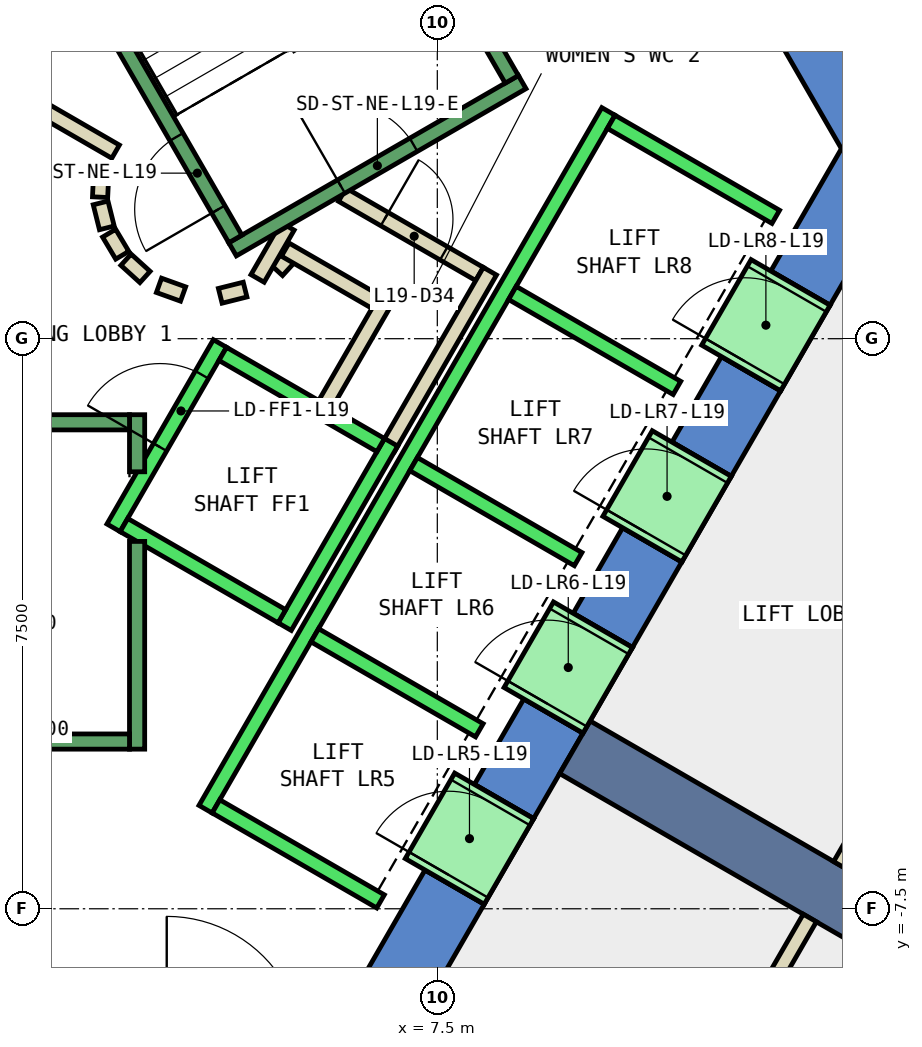
"""IFC4 building model, lengths in metres.
Left out: names, types, materials, properties, quantities, classifications, styles, units other than length and angle.
Written with IfcOpenShell. Run it as: python <this file> out.ifc"""

import sys

from ifc_helpers import new_model, si_unit, direction, frame, frame_2d, origin, place, context, subcontext, project, spatial, polyline, rectangle, outline, extrude, element, fill, save


model = new_model("IFC4")
c1 = context("Model", 3, precision=1e-05, world=origin(), true_north=direction((0.0, 1.0)))
c2 = subcontext(c1, "Body", "Model", "MODEL_VIEW")
j1 = project(units=[si_unit("LENGTHUNIT", "METRE"), si_unit("PLANEANGLEUNIT", "RADIAN")], contexts=[c1])
p1 = place(None, origin())
s1 = spatial("IfcSite", under=j1, at=p1, CompositionType="ELEMENT")
p2 = place(p1, origin())
s2 = spatial("IfcBuilding", under=s1, at=p2, CompositionType="ELEMENT")
p3 = place(p2, frame((0.0, 0.0, 90.8)))
s3 = spatial("IfcBuildingStorey", under=s2, at=p3, CompositionType="ELEMENT", Elevation=90.8)
p4 = place(p3, frame((0.0, 0.0, -0.4)))
e1 = element("IfcWall", 1, at=p4, inside=s3, PredefinedType="SHEAR", context=c2, shape_type="SweptSolid", body=[
    extrude(outline(polyline([(8.517, 11.748), (7.738, 11.298), (12.817, 2.5), (13.856, 2.5), (8.517, 11.748)])), origin(), (0.0, 0.0, 1.0), 4.2),
])
p5 = place(p3, frame((0.0, 0.0, -0.4)))
e2 = element("IfcWall", 2, at=p5, inside=s3, PredefinedType="SHEAR", context=c2, shape_type="SweptSolid", body=[
    extrude(outline(polyline([(8.117, -7.44), (7.338, -6.99), (6.409, -8.6), (6.928, -9.5), (8.117, -7.44)])), origin(), (0.0, 0.0, 1.0), 4.2),
])
p6 = place(p3, frame((0.0, 0.0, -0.4)))
e3 = element("IfcWall", 3, at=p6, inside=s3, PredefinedType="SHEAR", context=c2, shape_type="SweptSolid", body=[
    extrude(outline(polyline([(9.417, -5.189), (8.638, -4.739), (7.988, -5.864), (8.767, -6.314), (9.417, -5.189)])), origin(), (0.0, 0.0, 1.0), 4.2),
])
p7 = place(p3, frame((0.0, 0.0, -0.4)))
e4 = element("IfcWall", 4, at=p7, inside=s3, PredefinedType="SHEAR", context=c2, shape_type="SweptSolid", body=[
    extrude(outline(polyline([(10.717, -2.937), (9.938, -2.487), (9.288, -3.613), (10.067, -4.063), (10.717, -2.937)])), origin(), (0.0, 0.0, 1.0), 4.2),
])
p8 = place(p3, frame((0.0, 0.0, -0.4)))
e5 = element("IfcWall", 5, at=p8, inside=s3, PredefinedType="SHEAR", context=c2, shape_type="SweptSolid", body=[
    extrude(outline(polyline([(12.017, -0.686), (11.238, -0.236), (10.588, -1.361), (11.367, -1.811), (12.017, -0.686)])), origin(), (0.0, 0.0, 1.0), 4.2),
])
p9 = place(p3, frame((0.0, 0.0, -0.4)))
e6 = element("IfcWall", 6, at=p9, inside=s3, PredefinedType="SHEAR", context=c2, shape_type="SweptSolid", body=[
    extrude(outline(polyline([(11.888, 0.89), (12.667, 0.44), (13.856, 2.5), (12.817, 2.5), (11.888, 0.89)])), origin(), (0.0, 0.0, 1.0), 4.2),
])
p10 = place(p3, frame((0.0, 0.0, 3.6)))
e7 = element("IfcWall", 7, at=p10, inside=s3, PredefinedType="SHEAR", context=c2, shape_type="SweptSolid", body=[
    extrude(outline(polyline([(8.767, -6.314), (7.988, -5.864), (7.338, -6.99), (8.117, -7.44), (8.767, -6.314)])), origin(), (0.0, 0.0, 1.0), 0.2),
])
p11 = place(p3, frame((0.0, 0.0, 3.6)))
e8 = element("IfcWall", 8, at=p11, inside=s3, PredefinedType="SHEAR", context=c2, shape_type="SweptSolid", body=[
    extrude(outline(polyline([(10.067, -4.063), (9.288, -3.613), (8.638, -4.739), (9.417, -5.189), (10.067, -4.063)])), origin(), (0.0, 0.0, 1.0), 0.2),
])
p12 = place(p3, frame((0.0, 0.0, 3.6)))
e9 = element("IfcWall", 9, at=p12, inside=s3, PredefinedType="SHEAR", context=c2, shape_type="SweptSolid", body=[
    extrude(outline(polyline([(11.367, -1.811), (10.588, -1.361), (9.938, -2.487), (10.717, -2.937), (11.367, -1.811)])), origin(), (0.0, 0.0, 1.0), 0.2),
])
p13 = place(p3, frame((0.0, 0.0, 3.6)))
e10 = element("IfcWall", 10, at=p13, inside=s3, PredefinedType="SHEAR", context=c2, shape_type="SweptSolid", body=[
    extrude(outline(polyline([(12.667, 0.44), (11.888, 0.89), (11.238, -0.236), (12.017, -0.686), (12.667, 0.44)])), origin(), (0.0, 0.0, 1.0), 0.2),
])
p14 = place(p3, frame((9.31, -5.375, -0.4), z_axis=(0.0, 0.0, 1.0), x_axis=(0.866017533419, -0.500013631625, 0.0)))
e11 = element("IfcWall", 11, at=p14, inside=s3, PredefinedType="SHEAR", context=c2, shape_type="SweptSolid", body=[
    extrude(rectangle(XDim=9.0, YDim=0.8, at=frame_2d((4.5, 0.0))), origin(), (0.0, 0.0, 1.0), 4.2),
])
p15 = place(p3, frame((5.39, 0.898, 0.0), z_axis=(0.0, 0.0, 1.0), x_axis=(0.673828488714, 0.738887791073, 0.0)))
e12 = element("IfcWall", 12, at=p15, inside=s3, PredefinedType="PARTITIONING", context=c2, shape_type="SweptSolid", body=[
    extrude(rectangle(XDim=0.263, YDim=0.2, at=frame_2d((0.131, 0.0))), origin(), (0.0, 0.0, 1.0), 3.8),
])
p16 = place(p3, frame((5.499, 1.172, 0.0), z_axis=(0.0, 0.0, 1.0), x_axis=(0.866333505267, -0.499465972466, 0.0)))
e13 = element("IfcWall", 13, at=p16, inside=s3, PredefinedType="PARTITIONING", context=c2, shape_type="SweptSolid", body=[
    extrude(rectangle(XDim=1.374, YDim=0.2, at=frame_2d((0.687, 0.0))), origin(), (0.0, 0.0, 1.0), 3.8),
])
p17 = place(p3, frame((6.826, 0.522, 0.0), z_axis=(0.0, 0.0, 1.0), x_axis=(-0.500016722714, -0.866015748706, 0.0)))
e14 = element("IfcWall", 14, at=p17, inside=s3, PredefinedType="PARTITIONING", context=c2, shape_type="SweptSolid", body=[
    extrude(rectangle(XDim=1.7, YDim=0.2, at=frame_2d((0.85, 0.0))), origin(), (0.0, 0.0, 1.0), 3.8),
])
p18 = place(p3, frame((6.25, 1.894, 0.0), z_axis=(0.0, 0.0, 1.0), x_axis=(0.866043184279, -0.499969202016, 0.0)))
e15 = element("IfcWall", 15, at=p18, inside=s3, PredefinedType="PARTITIONING", context=c2, shape_type="SweptSolid", body=[
    extrude(rectangle(XDim=2.084, YDim=0.2, at=frame_2d((1.042, 0.0))), origin(), (0.0, 0.0, 1.0), 3.8),
])
p19 = place(p18, frame((0.642, 0.0, 0.0)))
e16 = element("IfcOpeningElement", 16, at=p19, cuts=e15, PredefinedType="OPENING", context=c2, shape_type="SweptSolid", body=[
    extrude(rectangle(XDim=0.9, YDim=2.1, at=frame_2d((0.45, 1.05))), frame((0.0, 0.11, 0.0), z_axis=(0.0, -1.0, 0.0), x_axis=(1.0, 0.0, 0.0)), (0.0, 0.0, 1.0), 0.22),
])
p20 = place(p3, frame((8.192, 0.888, 0.0), z_axis=(0.0, 0.0, 1.0), x_axis=(-0.499940625693, -0.866059680843, 0.0)))
e17 = element("IfcWall", 17, at=p20, inside=s3, PredefinedType="PARTITIONING", context=c2, shape_type="SweptSolid", body=[
    extrude(rectangle(XDim=2.68, YDim=0.2, at=frame_2d((1.34, 0.0))), origin(), (0.0, 0.0, 1.0), 3.8),
])
p21 = place(p3, frame((5.135, 0.793, 0.0), z_axis=(0.0, 0.0, 1.0), x_axis=(0.499526442893, 0.866298639529, 0.0)))
e18 = element("IfcWall", 18, at=p21, inside=s3, PredefinedType="PARTITIONING", context=c2, shape_type="SweptSolid", body=[
    extrude(rectangle(XDim=0.791, YDim=0.2, at=frame_2d((0.396, 0.0))), origin(), (0.0, 0.0, 1.0), 3.8),
])
p22 = place(p3, frame((2.012, 3.186, 0.0), z_axis=(0.0, 0.0, 1.0), x_axis=(0.865891012941, -0.500232699559, 0.0)))
e19 = element("IfcWall", 19, at=p22, inside=s3, PredefinedType="PARTITIONING", context=c2, shape_type="SweptSolid", body=[
    extrude(rectangle(XDim=1.449, YDim=0.2, at=frame_2d((0.725, 0.0))), origin(), (0.0, 0.0, 1.0), 3.8),
])
p23 = place(p3, frame((3.079, 2.199, 0.0), z_axis=(0.0, 0.0, 1.0), x_axis=(-0.047771483479, -0.998858290933, 0.0)))
e20 = element("IfcWall", 20, at=p23, inside=s3, PredefinedType="PARTITIONING", context=c2, shape_type="SweptSolid", body=[
    extrude(rectangle(XDim=0.337, YDim=0.2, at=frame_2d((0.169, 0.0))), origin(), (0.0, 0.0, 1.0), 3.8),
])
p24 = place(p3, frame((3.07, 1.786, 0.0), z_axis=(0.0, 0.0, 1.0), x_axis=(0.242705583207, -0.970099994784, 0.0)))
e21 = element("IfcWall", 21, at=p24, inside=s3, PredefinedType="PARTITIONING", context=c2, shape_type="SweptSolid", body=[
    extrude(rectangle(XDim=0.338, YDim=0.2, at=frame_2d((0.169, 0.0))), origin(), (0.0, 0.0, 1.0), 3.8),
])
for number, where, z_axis, x_axis in (
    (22, (3.182, 1.388, 0.0), (0.0, 0.0, 1.0), (0.512, -0.859, 0.0)),
    (23, (3.404, 1.039, 0.0), (0.0, 0.0, 1.0), (0.74, -0.672, 0.0)),
):
    element("IfcWall", number, at=place(p3, frame(where, z_axis=z_axis, x_axis=x_axis)), inside=s3, PredefinedType="PARTITIONING", context=c2, shape_type="SweptSolid", body=[
        extrude(rectangle(XDim=0.338, YDim=0.2, at=frame_2d((0.169, 0.0))), origin(), (0.0, 0.0, 1.0), 3.8),
    ])
p25 = place(p3, frame((3.838, 0.702, 0.0), z_axis=(0.0, 0.0, 1.0), x_axis=(0.941035081519, -0.338308993895, 0.0)))
e24 = element("IfcWall", 24, at=p25, inside=s3, PredefinedType="PARTITIONING", context=c2, shape_type="SweptSolid", body=[
    extrude(rectangle(XDim=0.337, YDim=0.2, at=frame_2d((0.168, 0.0))), origin(), (0.0, 0.0, 1.0), 3.8),
])
p26 = place(p3, frame((4.644, 0.564, 0.0), z_axis=(0.0, 0.0, 1.0), x_axis=(0.969929076366, 0.243387729394, 0.0)))
e25 = element("IfcWall", 25, at=p26, inside=s3, PredefinedType="PARTITIONING", context=c2, shape_type="SweptSolid", body=[
    extrude(rectangle(XDim=0.337, YDim=0.2, at=frame_2d((0.168, 0.0))), origin(), (0.0, 0.0, 1.0), 3.8),
])
p27 = place(p3, frame((18.009, 2.092, 0.0), z_axis=(0.0, 0.0, 1.0), x_axis=(-0.499980796252, -0.866036490789, 0.0)))
e26 = element("IfcWall", 26, at=p27, inside=s3, PredefinedType="PARTITIONING", context=c2, shape_type="SweptSolid", body=[
    extrude(rectangle(XDim=10.417, YDim=0.2, at=frame_2d((5.208, 0.0))), origin(), (0.0, 0.0, 1.0), 3.8),
])
p28 = place(p3, frame((12.401, -7.621, 0.0), z_axis=(0.0, 0.0, 1.0), x_axis=(-0.499983724212, -0.866034800411, 0.0)))
e27 = element("IfcWall", 27, at=p28, inside=s3, PredefinedType="PARTITIONING", context=c2, shape_type="SweptSolid", body=[
    extrude(rectangle(XDim=9.302, YDim=0.2, at=frame_2d((4.651, 0.0))), origin(), (0.0, 0.0, 1.0), 3.8),
])
p29 = place(p3, frame((3.24, -2.488, 0.0), z_axis=(0.0, 0.0, 1.0), x_axis=(0.49994636267, 0.866056369097, 0.0)))
e28 = element("IfcWall", 28, at=p29, inside=s3, PredefinedType="STANDARD", context=c2, shape_type="SweptSolid", body=[
    extrude(rectangle(XDim=2.8, YDim=0.2, at=frame_2d((1.4, 0.0))), origin(), (0.0, 0.0, 1.0), 3.8),
])
p30 = place(p29, frame((1.225, 0.0, 0.0)))
e29 = element("IfcOpeningElement", 29, at=p30, cuts=e28, PredefinedType="OPENING", context=c2, shape_type="SweptSolid", body=[
    extrude(rectangle(XDim=1.1, YDim=2.1, at=frame_2d((0.55, 1.05))), frame((0.0, 0.11, 0.0), z_axis=(0.0, -1.0, 0.0), x_axis=(1.0, 0.0, 0.0)), (0.0, 0.0, 1.0), 0.22),
])
p31 = place(p3, frame((5.492, -3.788, 0.0), z_axis=(0.0, 0.0, 1.0), x_axis=(0.500011755427, 0.866018616679, 0.0)))
e30 = element("IfcWall", 30, at=p31, inside=s3, PredefinedType="STANDARD", context=c2, shape_type="SweptSolid", body=[
    extrude(rectangle(XDim=2.8, YDim=0.2, at=frame_2d((1.4, 0.0))), origin(), (0.0, 0.0, 1.0), 3.8),
])
p32 = place(p3, frame((3.377, -2.452, 0.0), z_axis=(0.0, 0.0, 1.0), x_axis=(0.865955154139, -0.50012165622, 0.0)))
e31 = element("IfcWall", 31, at=p32, inside=s3, PredefinedType="STANDARD", context=c2, shape_type="SweptSolid", body=[
    extrude(rectangle(XDim=2.4, YDim=0.2, at=frame_2d((1.2, 0.0))), origin(), (0.0, 0.0, 1.0), 3.8),
])
p33 = place(p3, frame((4.677, -0.2, 0.0), z_axis=(0.0, 0.0, 1.0), x_axis=(0.865973769406, -0.500089422704, 0.0)))
e32 = element("IfcWall", 32, at=p33, inside=s3, PredefinedType="STANDARD", context=c2, shape_type="SweptSolid", body=[
    extrude(rectangle(XDim=2.399, YDim=0.2, at=frame_2d((1.2, 0.0))), origin(), (0.0, 0.0, 1.0), 3.8),
])
p34 = place(p3, frame((4.451, -6.19, 0.0), z_axis=(0.0, 0.0, 1.0), x_axis=(0.50000090737, 0.866024879913, 0.0)))
e33 = element("IfcWall", 33, at=p34, inside=s3, PredefinedType="STANDARD", context=c2, shape_type="SweptSolid", body=[
    extrude(rectangle(XDim=10.6, YDim=0.2, at=frame_2d((5.3, 0.0))), origin(), (0.0, 0.0, 1.0), 3.8),
])
for number, where, z_axis, x_axis in (
    (34, (4.588, -6.153, 0.0), (0.0, 0.0, 1.0), (0.866, -0.5, 0.0)),
    (35, (5.888, -3.902, 0.0), (0.0, 0.0, 1.0), (0.866, -0.5, 0.0)),
    (36, (7.188, -1.65, 0.0), (0.0, 0.0, 1.0), (0.866, -0.5, 0.0)),
    (37, (8.488, 0.602, 0.0), (0.0, 0.0, 1.0), (0.866, -0.5, 0.0)),
):
    element("IfcWall", number, at=place(p3, frame(where, z_axis=z_axis, x_axis=x_axis)), inside=s3, PredefinedType="STANDARD", context=c2, shape_type="SweptSolid", body=[
        extrude(rectangle(XDim=2.5, YDim=0.2, at=frame_2d((1.25, 0.0))), origin(), (0.0, 0.0, 1.0), 3.8),
    ])
p35 = place(p3, frame((9.788, 2.853, 0.0), z_axis=(0.0, 0.0, 1.0), x_axis=(0.865998541277, -0.500046524342, 0.0)))
e38 = element("IfcWall", 38, at=p35, inside=s3, PredefinedType="STANDARD", context=c2, shape_type="SweptSolid", body=[
    extrude(rectangle(XDim=2.5, YDim=0.2, at=frame_2d((1.25, 0.0))), origin(), (0.0, 0.0, 1.0), 3.8),
])
p36 = place(p3, frame((7.598, -7.14, 0.0), z_axis=(0.0, 0.0, 1.0), x_axis=(0.500362116554, 0.865816234728, 0.0)))
e39 = element("IfcWall", 39, at=p36, inside=s3, PredefinedType="STANDARD", context=c2, shape_type="SweptSolid", body=[
    extrude(rectangle(XDim=1.299, YDim=1.2, at=frame_2d((0.65, 0.0))), origin(), (0.0, 0.0, 1.0), 2.4),
])
p37 = place(p36, frame((0.1, 0.0, 0.0)))
e40 = element("IfcOpeningElement", 40, at=p37, cuts=e39, PredefinedType="OPENING", context=c2, shape_type="SweptSolid", body=[
    extrude(rectangle(XDim=1.1, YDim=2.3, at=frame_2d((0.55, 1.15))), frame((0.0, 0.61, 0.0), z_axis=(0.0, -1.0, 0.0), x_axis=(1.0, 0.0, 0.0)), (0.0, 0.0, 1.0), 1.22),
])
p38 = place(p3, frame((8.898, -4.889, 0.0), z_axis=(0.0, 0.0, 1.0), x_axis=(0.500036693733, 0.866004217611, 0.0)))
e41 = element("IfcWall", 41, at=p38, inside=s3, PredefinedType="STANDARD", context=c2, shape_type="SweptSolid", body=[
    extrude(rectangle(XDim=1.3, YDim=1.2, at=frame_2d((0.65, 0.0))), origin(), (0.0, 0.0, 1.0), 2.4),
])
p39 = place(p38, frame((0.1, 0.0, 0.0)))
e42 = element("IfcOpeningElement", 42, at=p39, cuts=e41, PredefinedType="OPENING", context=c2, shape_type="SweptSolid", body=[
    extrude(rectangle(XDim=1.1, YDim=2.3, at=frame_2d((0.55, 1.15))), frame((0.0, 0.61, 0.0), z_axis=(0.0, -1.0, 0.0), x_axis=(1.0, 0.0, 0.0)), (0.0, 0.0, 1.0), 1.22),
])
p40 = place(p3, frame((10.198, -2.637, 0.0), z_axis=(0.0, 0.0, 1.0), x_axis=(0.49989585183, 0.866085525409, 0.0)))
e43 = element("IfcWall", 43, at=p40, inside=s3, PredefinedType="STANDARD", context=c2, shape_type="SweptSolid", body=[
    extrude(rectangle(XDim=1.3, YDim=1.2, at=frame_2d((0.65, 0.0))), origin(), (0.0, 0.0, 1.0), 2.4),
])
p41 = place(p40, frame((0.1, 0.0, 0.0)))
e44 = element("IfcOpeningElement", 44, at=p41, cuts=e43, PredefinedType="OPENING", context=c2, shape_type="SweptSolid", body=[
    extrude(rectangle(XDim=1.1, YDim=2.3, at=frame_2d((0.55, 1.15))), frame((0.0, 0.61, 0.0), z_axis=(0.0, -1.0, 0.0), x_axis=(1.0, 0.0, 0.0)), (0.0, 0.0, 1.0), 1.22),
])
p42 = place(p3, frame((11.498, -0.385, 0.0), z_axis=(0.0, 0.0, 1.0), x_axis=(0.500221244143, 0.865897630733, 0.0)))
e45 = element("IfcWall", 45, at=p42, inside=s3, PredefinedType="STANDARD", context=c2, shape_type="SweptSolid", body=[
    extrude(rectangle(XDim=1.299, YDim=1.2, at=frame_2d((0.65, 0.0))), origin(), (0.0, 0.0, 1.0), 2.4),
])
p43 = place(p42, frame((0.1, 0.0, 0.0)))
e46 = element("IfcOpeningElement", 46, at=p43, cuts=e45, PredefinedType="OPENING", context=c2, shape_type="SweptSolid", body=[
    extrude(rectangle(XDim=1.1, YDim=2.3, at=frame_2d((0.55, 1.15))), frame((0.0, 0.61, 0.0), z_axis=(0.0, -1.0, 0.0), x_axis=(1.0, 0.0, 0.0)), (0.0, 0.0, 1.0), 1.22),
])
p44 = place(p3, frame((3.55, -2.667, 0.0), z_axis=(0.0, 0.0, 1.0), x_axis=(0.0, -1.0, 0.0)))
e47 = element("IfcWall", 47, at=p44, inside=s3, PredefinedType="STANDARD", context=c2, shape_type="SweptSolid", body=[
    extrude(rectangle(XDim=2.733, YDim=0.2, at=frame_2d((1.366, 0.0))), origin(), (0.0, 0.0, 1.0), 3.8),
])
p45 = place(p3, frame((3.55, -1.0, 0.0), z_axis=(0.0, 0.0, 1.0), x_axis=(0.0, -1.0, 0.0)))
e48 = element("IfcWall", 48, at=p45, inside=s3, PredefinedType="STANDARD", context=c2, shape_type="SweptSolid", body=[
    extrude(rectangle(XDim=0.751, YDim=0.2, at=frame_2d((0.375, 0.0))), origin(), (0.0, 0.0, 1.0), 3.8),
])
p46 = place(p3, frame((-3.45, -1.1, 0.0), z_axis=(0.0, 0.0, 1.0), x_axis=(1.0, 0.0, 0.0)))
e49 = element("IfcWall", 49, at=p46, inside=s3, PredefinedType="STANDARD", context=c2, shape_type="SweptSolid", body=[
    extrude(rectangle(XDim=6.9, YDim=0.2, at=frame_2d((3.45, 0.0))), origin(), (0.0, 0.0, 1.0), 3.8),
])
p47 = place(p46, frame((0.45, 0.0, 0.0)))
e50 = element("IfcOpeningElement", 50, at=p47, cuts=e49, PredefinedType="OPENING", context=c2, shape_type="SweptSolid", body=[
    extrude(rectangle(XDim=1.1, YDim=2.2, at=frame_2d((0.55, 1.1))), frame((0.0, 0.11, 0.0), z_axis=(0.0, -1.0, 0.0), x_axis=(1.0, 0.0, 0.0)), (0.0, 0.0, 1.0), 0.22),
])
p48 = place(p3, frame((-3.45, -5.3, 0.0), z_axis=(0.0, 0.0, 1.0), x_axis=(1.0, 0.0, 0.0)))
e51 = element("IfcWall", 51, at=p48, inside=s3, PredefinedType="STANDARD", context=c2, shape_type="SweptSolid", body=[
    extrude(rectangle(XDim=6.9, YDim=0.2, at=frame_2d((3.45, 0.0))), origin(), (0.0, 0.0, 1.0), 3.8),
])
p49 = place(p3, frame((4.806, 1.176, 0.0), z_axis=(0.0, 0.0, 1.0), x_axis=(0.866059941101, 0.499940174841, 0.0)))
e52 = element("IfcWall", 52, at=p49, inside=s3, PredefinedType="STANDARD", context=c2, shape_type="SweptSolid", body=[
    extrude(rectangle(XDim=4.4, YDim=0.2, at=frame_2d((2.2, 0.0))), origin(), (0.0, 0.0, 1.0), 3.8),
])
p50 = place(p49, frame((1.65, 0.0, 0.0)))
e53 = element("IfcOpeningElement", 53, at=p50, cuts=e52, PredefinedType="OPENING", context=c2, shape_type="SweptSolid", body=[
    extrude(rectangle(XDim=1.1, YDim=2.2, at=frame_2d((0.55, 1.1))), frame((0.0, 0.11, 0.0), z_axis=(0.0, -1.0, 0.0), x_axis=(1.0, 0.0, 0.0)), (0.0, 0.0, 1.0), 0.22),
])
p51 = place(p3, frame((4.843, 1.312, 0.0), z_axis=(0.0, 0.0, 1.0), x_axis=(-0.499963383562, 0.866046543262, 0.0)))
e54 = element("IfcWall", 54, at=p51, inside=s3, PredefinedType="STANDARD", context=c2, shape_type="SweptSolid", body=[
    extrude(rectangle(XDim=6.9, YDim=0.2, at=frame_2d((3.45, 0.0))), origin(), (0.0, 0.0, 1.0), 3.8),
])
p52 = place(p51, frame((0.45, 0.0, 0.0)))
e55 = element("IfcOpeningElement", 55, at=p52, cuts=e54, PredefinedType="OPENING", context=c2, shape_type="SweptSolid", body=[
    extrude(rectangle(XDim=1.1, YDim=2.2, at=frame_2d((0.55, 1.1))), frame((0.0, 0.11, 0.0), z_axis=(0.0, -1.0, 0.0), x_axis=(1.0, 0.0, 0.0)), (0.0, 0.0, 1.0), 0.22),
])
p53 = place(p3, frame((8.48, 3.412, 0.0), z_axis=(0.0, 0.0, 1.0), x_axis=(-0.499978703459, 0.866037698999, 0.0)))
e56 = element("IfcWall", 56, at=p53, inside=s3, PredefinedType="STANDARD", context=c2, shape_type="SweptSolid", body=[
    extrude(rectangle(XDim=6.9, YDim=0.2, at=frame_2d((3.45, 0.0))), origin(), (0.0, 0.0, 1.0), 3.8),
])
p54 = place(p19, origin())
e57 = element("IfcDoor", 57, at=p54, inside=s3, OperationType="SINGLE_SWING_LEFT", PredefinedType="DOOR", context=c2, shape_type="SweptSolid", body=[
    extrude(rectangle(XDim=0.9, YDim=2.1, at=frame_2d((0.45, 1.05))), frame((0.0, 0.025, 0.0), z_axis=(0.0, -1.0, 0.0), x_axis=(1.0, 0.0, 0.0)), (0.0, 0.0, 1.0), 0.05),
])
fill(e16, e57)
p55 = place(p37, origin())
e58 = element("IfcDoor", 58, at=p55, inside=s3, OperationType="SLIDING_TO_LEFT", PredefinedType="DOOR", context=c2, shape_type="SweptSolid", body=[
    extrude(rectangle(XDim=1.1, YDim=2.3, at=frame_2d((0.55, 1.15))), frame((0.0, 0.025, 0.0), z_axis=(0.0, -1.0, 0.0), x_axis=(1.0, 0.0, 0.0)), (0.0, 0.0, 1.0), 0.05),
])
fill(e40, e58)
p56 = place(p39, origin())
e59 = element("IfcDoor", 59, at=p56, inside=s3, OperationType="SLIDING_TO_LEFT", PredefinedType="DOOR", context=c2, shape_type="SweptSolid", body=[
    extrude(rectangle(XDim=1.1, YDim=2.3, at=frame_2d((0.55, 1.15))), frame((0.0, 0.025, 0.0), z_axis=(0.0, -1.0, 0.0), x_axis=(1.0, 0.0, 0.0)), (0.0, 0.0, 1.0), 0.05),
])
fill(e42, e59)
p57 = place(p41, origin())
e60 = element("IfcDoor", 60, at=p57, inside=s3, OperationType="SLIDING_TO_LEFT", PredefinedType="DOOR", context=c2, shape_type="SweptSolid", body=[
    extrude(rectangle(XDim=1.1, YDim=2.3, at=frame_2d((0.55, 1.15))), frame((0.0, 0.025, 0.0), z_axis=(0.0, -1.0, 0.0), x_axis=(1.0, 0.0, 0.0)), (0.0, 0.0, 1.0), 0.05),
])
fill(e44, e60)
p58 = place(p43, origin())
e61 = element("IfcDoor", 61, at=p58, inside=s3, OperationType="SLIDING_TO_LEFT", PredefinedType="DOOR", context=c2, shape_type="SweptSolid", body=[
    extrude(rectangle(XDim=1.1, YDim=2.3, at=frame_2d((0.55, 1.15))), frame((0.0, 0.025, 0.0), z_axis=(0.0, -1.0, 0.0), x_axis=(1.0, 0.0, 0.0)), (0.0, 0.0, 1.0), 0.05),
])
fill(e46, e61)
p59 = place(p30, origin())
e62 = element("IfcDoor", 62, at=p59, inside=s3, OperationType="SLIDING_TO_LEFT", PredefinedType="DOOR", context=c2, shape_type="SweptSolid", body=[
    extrude(rectangle(XDim=1.1, YDim=2.1, at=frame_2d((0.55, 1.05))), frame((0.0, 0.025, 0.0), z_axis=(0.0, -1.0, 0.0), x_axis=(1.0, 0.0, 0.0)), (0.0, 0.0, 1.0), 0.05),
])
fill(e29, e62)
p60 = place(p52, origin())
e63 = element("IfcDoor", 63, at=p60, inside=s3, OperationType="SINGLE_SWING_LEFT", PredefinedType="DOOR", context=c2, shape_type="SweptSolid", body=[
    extrude(rectangle(XDim=1.1, YDim=2.2, at=frame_2d((0.55, 1.1))), frame((0.0, 0.025, 0.0), z_axis=(0.0, -1.0, 0.0), x_axis=(1.0, 0.0, 0.0)), (0.0, 0.0, 1.0), 0.05),
])
fill(e55, e63)
p61 = place(p50, origin())
e64 = element("IfcDoor", 64, at=p61, inside=s3, OperationType="SINGLE_SWING_LEFT", PredefinedType="DOOR", context=c2, shape_type="SweptSolid", body=[
    extrude(rectangle(XDim=1.1, YDim=2.2, at=frame_2d((0.55, 1.1))), frame((0.0, 0.025, 0.0), z_axis=(0.0, -1.0, 0.0), x_axis=(1.0, 0.0, 0.0)), (0.0, 0.0, 1.0), 0.05),
])
fill(e53, e64)
save(model, sys.argv[1])
